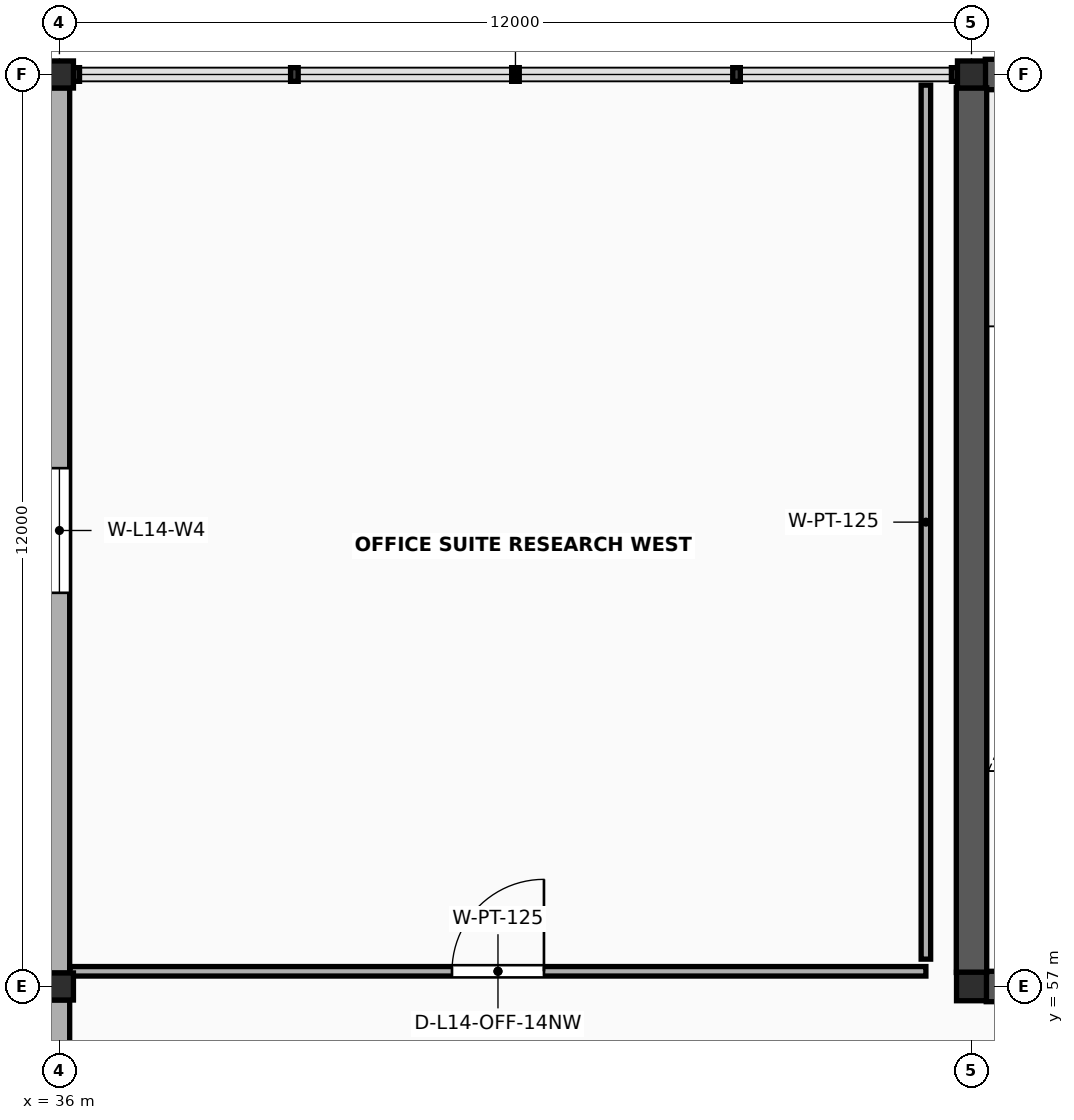
"""IFC4 building model, lengths in metres.
Left out: names, types, materials, properties, quantities, classifications, styles, units other than length and angle.
Written with IfcOpenShell. Run it as: python <this file> out.ifc"""

import sys

from ifc_helpers import new_model, si_unit, direction, frame, frame_2d, origin, origin_2d, place, context, subcontext, project, spatial, rectangle, i_section, extrude, element, fill, save


model = new_model("IFC4")
c1 = context("Model", 3, precision=1e-05, world=origin(), true_north=direction((0.0, 1.0)))
c2 = subcontext(c1, "Body", "Model", "MODEL_VIEW")
j1 = project(units=[si_unit("LENGTHUNIT", "METRE"), si_unit("PLANEANGLEUNIT", "RADIAN")], contexts=[c1])
p1 = place(None, origin())
s1 = spatial("IfcSite", under=j1, at=p1, CompositionType="ELEMENT")
p2 = place(p1, origin())
s2 = spatial("IfcBuilding", under=s1, at=p2, CompositionType="ELEMENT")
p3 = place(p2, frame((0.0, 0.0, 57.6)))
s3 = spatial("IfcBuildingStorey", under=s2, at=p3, CompositionType="ELEMENT", Elevation=57.6)
for number, where, z_axis, x_axis in (
    (1, (36.0, 57.0, 0.0), (0.0, 0.0, 1.0), (1.0, 0.0, 0.0)),
    (2, (36.0, 69.0, 0.0), (0.0, 0.0, 1.0), (1.0, 0.0, 0.0)),
):
    element("IfcColumn", number, at=place(p3, frame(where, z_axis=z_axis, x_axis=x_axis)), inside=s3, PredefinedType="COLUMN", context=c2, shape_type="SweptSolid", body=[
        extrude(i_section(OverallWidth=0.369, OverallDepth=0.356, WebThickness=0.011, FlangeThickness=0.018, FilletRadius=0.018, at=origin_2d()), origin(), (0.0, 0.0, 1.0), 4.0),
    ])
p4 = place(p3, frame((48.0, 57.0, 0.0), z_axis=(0.0, 0.0, 1.0), x_axis=(1.0, 0.0, 0.0)))
e3 = element("IfcColumn", 3, at=p4, inside=s3, PredefinedType="COLUMN", context=c2, shape_type="SweptSolid", body=[
    extrude(i_section(OverallWidth=0.394, OverallDepth=0.375, WebThickness=0.017, FlangeThickness=0.028, FilletRadius=0.018, at=origin_2d()), origin(), (0.0, 0.0, 1.0), 4.0),
])
p5 = place(p3, frame((48.0, 69.0, 0.0), z_axis=(0.0, 0.0, 1.0), x_axis=(1.0, 0.0, 0.0)))
e4 = element("IfcColumn", 4, at=p5, inside=s3, PredefinedType="COLUMN", context=c2, shape_type="SweptSolid", body=[
    extrude(i_section(OverallWidth=0.369, OverallDepth=0.356, WebThickness=0.011, FlangeThickness=0.018, FilletRadius=0.018, at=origin_2d()), origin(), (0.0, 0.0, 1.0), 4.0),
])
p6 = place(p3, frame((48.194, 57.0, 0.0), z_axis=(0.0, 0.0, 1.0), x_axis=(1.0, 0.0, 0.0)))
e5 = element("IfcWall", 5, at=p6, inside=s3, PredefinedType="SHEAR", context=c2, shape_type="SweptSolid", body=[
    extrude(rectangle(XDim=11.612, YDim=0.4, at=frame_2d((5.806, 0.0))), origin(), (0.0, 0.0, 1.0), 3.853),
])
p7 = place(p6, frame((5.006, 0.0, 0.0)))
e6 = element("IfcOpeningElement", 6, at=p7, cuts=e5, PredefinedType="OPENING", context=c2, shape_type="SweptSolid", body=[
    extrude(rectangle(XDim=1.2, YDim=2.2, at=frame_2d((0.6, 1.1))), frame((0.0, 0.215, 0.0), z_axis=(0.0, -1.0, 0.0), x_axis=(1.0, 0.0, 0.0)), (0.0, 0.0, 1.0), 0.43),
])
p8 = place(p6, frame((8.706, 0.0, 0.0)))
e7 = element("IfcOpeningElement", 7, at=p8, cuts=e5, PredefinedType="OPENING", context=c2, shape_type="SweptSolid", body=[
    extrude(rectangle(XDim=1.5, YDim=2.25, at=frame_2d((0.75, 1.125))), frame((0.0, 0.215, 0.0), z_axis=(0.0, -1.0, 0.0), x_axis=(1.0, 0.0, 0.0)), (0.0, 0.0, 1.0), 0.43),
])
p9 = place(p3, frame((48.181, 69.0, 0.0), z_axis=(0.0, 0.0, 1.0), x_axis=(1.0, 0.0, 0.0)))
e8 = element("IfcWall", 8, at=p9, inside=s3, PredefinedType="SHEAR", context=c2, shape_type="SweptSolid", body=[
    extrude(rectangle(XDim=11.637, YDim=0.4, at=frame_2d((5.819, 0.0))), origin(), (0.0, 0.0, 1.0), 3.853),
])
p10 = place(p3, frame((48.0, 57.185, 0.0), z_axis=(0.0, 0.0, 1.0), x_axis=(0.0, 1.0, 0.0)))
e9 = element("IfcWall", 9, at=p10, inside=s3, PredefinedType="SHEAR", context=c2, shape_type="SweptSolid", body=[
    extrude(rectangle(XDim=11.64, YDim=0.4, at=frame_2d((5.82, 0.0))), origin(), (0.0, 0.0, 1.0), 3.853),
])
p11 = place(p3, frame((36.0, 45.176, 0.0), z_axis=(0.0, 0.0, 1.0), x_axis=(0.0, 1.0, 0.0)))
e10 = element("IfcWall", 10, at=p11, inside=s3, PredefinedType="SOLIDWALL", context=c2, shape_type="SweptSolid", body=[
    extrude(rectangle(XDim=11.648, YDim=0.27, at=frame_2d((5.824, 0.0))), origin(), (0.0, 0.0, 1.0), 3.216),
])
p12 = place(p11, frame((5.094, 0.0, 0.78)))
e11 = element("IfcOpeningElement", 11, at=p12, cuts=e10, PredefinedType="OPENING", context=c2, shape_type="SweptSolid", body=[
    extrude(rectangle(XDim=1.46, YDim=1.74, at=frame_2d((0.73, 0.87))), frame((0.0, 0.15, 0.0), z_axis=(0.0, -1.0, 0.0), x_axis=(1.0, 0.0, 0.0)), (0.0, 0.0, 1.0), 0.3),
])
p13 = place(p3, frame((36.0, 57.176, 0.0), z_axis=(0.0, 0.0, 1.0), x_axis=(0.0, 1.0, 0.0)))
e12 = element("IfcWall", 12, at=p13, inside=s3, PredefinedType="SOLIDWALL", context=c2, shape_type="SweptSolid", body=[
    extrude(rectangle(XDim=11.648, YDim=0.27, at=frame_2d((5.824, 0.0))), origin(), (0.0, 0.0, 1.0), 3.216),
])
p14 = place(p13, frame((5.004, 0.0, 0.78)))
e13 = element("IfcOpeningElement", 13, at=p14, cuts=e12, PredefinedType="OPENING", context=c2, shape_type="SweptSolid", body=[
    extrude(rectangle(XDim=1.64, YDim=1.74, at=frame_2d((0.82, 0.87))), frame((0.0, 0.15, 0.0), z_axis=(0.0, -1.0, 0.0), x_axis=(1.0, 0.0, 0.0)), (0.0, 0.0, 1.0), 0.3),
])
p15 = place(p3, frame((36.14, 57.2, 0.0), z_axis=(0.0, 0.0, 1.0), x_axis=(1.0, 0.0, 0.0)))
e14 = element("IfcWall", 14, at=p15, inside=s3, PredefinedType="PARTITIONING", context=c2, shape_type="SweptSolid", body=[
    extrude(rectangle(XDim=11.26, YDim=0.125, at=frame_2d((5.63, 0.0))), origin(), (0.0, 0.0, 1.0), 2.88),
])
p16 = place(p15, frame((5.025, 0.0, 0.0)))
e15 = element("IfcOpeningElement", 15, at=p16, cuts=e14, PredefinedType="OPENING", context=c2, shape_type="SweptSolid", body=[
    extrude(rectangle(XDim=1.21, YDim=2.25, at=frame_2d((0.605, 1.125))), frame((0.0, 0.077, 0.0), z_axis=(0.0, -1.0, 0.0), x_axis=(1.0, 0.0, 0.0)), (0.0, 0.0, 1.0), 0.155),
])
p17 = place(p3, frame((47.4, 57.36, 0.0), z_axis=(0.0, 0.0, 1.0), x_axis=(0.0, 1.0, 0.0)))
e16 = element("IfcWall", 16, at=p17, inside=s3, PredefinedType="PARTITIONING", context=c2, shape_type="SweptSolid", body=[
    extrude(rectangle(XDim=11.5, YDim=0.125, at=frame_2d((5.75, 0.0))), origin(), (0.0, 0.0, 1.0), 2.88),
])
p18 = place(p14, origin())
e17 = element("IfcWindow", 17, at=p18, inside=s3, PartitioningType="SINGLE_PANEL", PredefinedType="WINDOW", context=c2, shape_type="SweptSolid", body=[
    extrude(rectangle(XDim=1.64, YDim=1.74, at=frame_2d((0.82, 0.87))), frame((0.0, 0.03, 0.0), z_axis=(0.0, -1.0, 0.0), x_axis=(1.0, 0.0, 0.0)), (0.0, 0.0, 1.0), 0.06),
])
fill(e13, e17)
p19 = place(p16, origin())
e18 = element("IfcDoor", 18, at=p19, inside=s3, OperationType="SINGLE_SWING_RIGHT", PredefinedType="DOOR", context=c2, shape_type="SweptSolid", body=[
    extrude(rectangle(XDim=1.21, YDim=2.25, at=frame_2d((0.605, 1.125))), frame((0.0, 0.025, 0.0), z_axis=(0.0, -1.0, 0.0), x_axis=(1.0, 0.0, 0.0)), (0.0, 0.0, 1.0), 0.05),
])
fill(e15, e18)
save(model, sys.argv[1])
